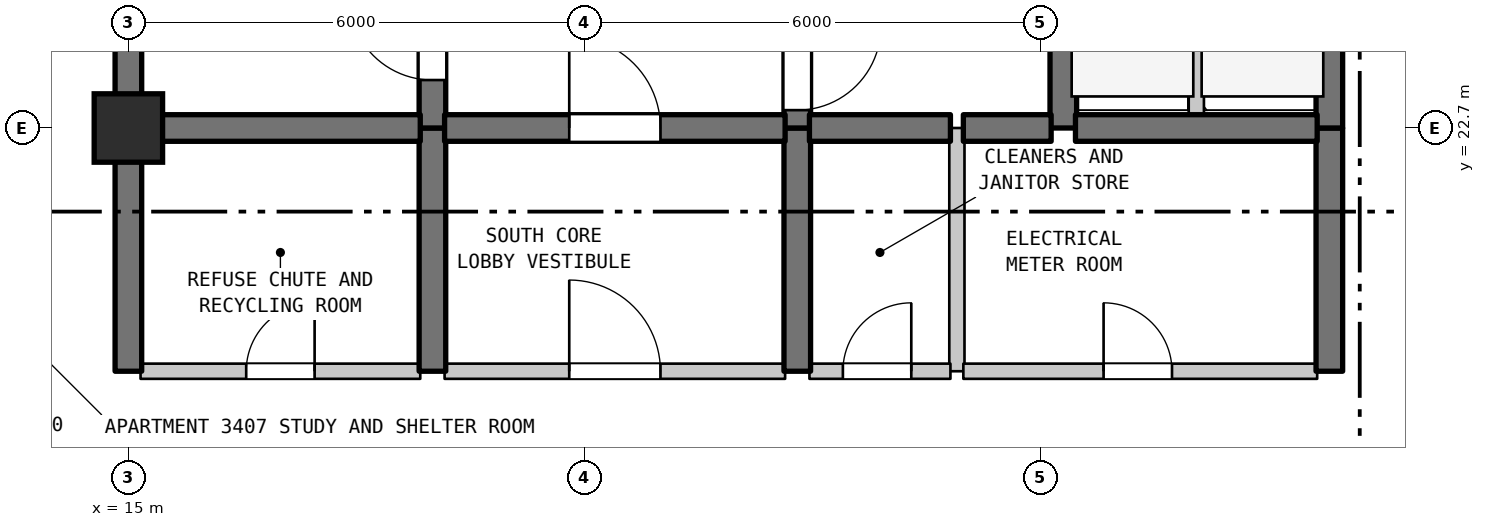
"""IFC4 building model, lengths in metres.
Left out: names, types, materials, properties, quantities, classifications, styles, units other than length and angle.
Written with IfcOpenShell. Run it as: python <this file> out.ifc"""

import sys

from ifc_helpers import new_model, si_unit, direction, frame, frame_2d, origin, origin_2d, place, context, subcontext, project, spatial, rectangle, extrude, element, fill, save


model = new_model("IFC4")
c1 = context("Model", 3, precision=1e-05, world=origin(), true_north=direction((0.0, 1.0)))
c2 = subcontext(c1, "Body", "Model", "MODEL_VIEW")
j1 = project(units=[si_unit("LENGTHUNIT", "METRE"), si_unit("PLANEANGLEUNIT", "RADIAN")], contexts=[c1])
p1 = place(None, origin())
s1 = spatial("IfcSite", under=j1, at=p1, CompositionType="ELEMENT")
p2 = place(p1, origin())
s2 = spatial("IfcBuilding", under=s1, at=p2, CompositionType="ELEMENT")
p3 = place(p2, frame((0.0, 0.0, 140.9)))
s3 = spatial("IfcBuildingStorey", under=s2, at=p3, CompositionType="ELEMENT", Elevation=140.9)
p4 = place(p3, frame((15.0, 22.7, 0.0), z_axis=(0.0, 0.0, 1.0), x_axis=(1.0, 0.0, 0.0)))
e1 = element("IfcColumn", 1, at=p4, inside=s3, PredefinedType="COLUMN", context=c2, shape_type="SweptSolid", body=[
    extrude(rectangle(XDim=0.9, YDim=0.9, at=origin_2d()), origin(), (0.0, 0.0, 1.0), 3.7),
])
p5 = place(p3, frame((15.0, 19.5, 0.0), z_axis=(0.0, 0.0, 1.0), x_axis=(0.0, 1.0, 0.0)))
e2 = element("IfcWall", 2, at=p5, inside=s3, PredefinedType="SHEAR", context=c2, shape_type="SweptSolid", body=[
    extrude(rectangle(XDim=3.2, YDim=0.35, at=frame_2d((1.6, 0.0))), origin(), (0.0, 0.0, 1.0), 3.385),
])
p6 = place(p3, frame((15.0, 22.7, 0.0), z_axis=(0.0, 0.0, 1.0), x_axis=(0.0, 1.0, 0.0)))
e3 = element("IfcWall", 3, at=p6, inside=s3, PredefinedType="SHEAR", context=c2, shape_type="SweptSolid", body=[
    extrude(rectangle(XDim=6.8, YDim=0.35, at=frame_2d((3.4, 0.0))), origin(), (0.0, 0.0, 1.0), 3.385),
])
p7 = place(p3, frame((19.0, 19.5, 0.0), z_axis=(0.0, 0.0, 1.0), x_axis=(0.0, 1.0, 0.0)))
e4 = element("IfcWall", 4, at=p7, inside=s3, PredefinedType="SHEAR", context=c2, shape_type="SweptSolid", body=[
    extrude(rectangle(XDim=3.2, YDim=0.35, at=frame_2d((1.6, 0.0))), origin(), (0.0, 0.0, 1.0), 3.385),
])
p8 = place(p3, frame((19.0, 22.7, 0.0), z_axis=(0.0, 0.0, 1.0), x_axis=(0.0, 1.0, 0.0)))
e5 = element("IfcWall", 5, at=p8, inside=s3, PredefinedType="SHEAR", context=c2, shape_type="SweptSolid", body=[
    extrude(rectangle(XDim=5.5, YDim=0.35, at=frame_2d((2.75, 0.0))), origin(), (0.0, 0.0, 1.0), 3.385),
])
p9 = place(p8, frame((0.631, 0.0, 0.0)))
e6 = element("IfcOpeningElement", 6, at=p9, cuts=e5, PredefinedType="OPENING", context=c2, shape_type="SweptSolid", body=[
    extrude(rectangle(XDim=1.1, YDim=2.15, at=frame_2d((0.55, 1.075))), frame((0.0, 0.185, 0.0), z_axis=(0.0, -1.0, 0.0), x_axis=(1.0, 0.0, 0.0)), (0.0, 0.0, 1.0), 0.37),
])
p10 = place(p3, frame((23.8, 19.5, 0.0), z_axis=(0.0, 0.0, 1.0), x_axis=(0.0, 1.0, 0.0)))
e7 = element("IfcWall", 7, at=p10, inside=s3, PredefinedType="SHEAR", context=c2, shape_type="SweptSolid", body=[
    extrude(rectangle(XDim=3.2, YDim=0.35, at=frame_2d((1.6, 0.0))), origin(), (0.0, 0.0, 1.0), 3.385),
])
p11 = place(p3, frame((23.8, 22.7, 0.0), z_axis=(0.0, 0.0, 1.0), x_axis=(0.0, 1.0, 0.0)))
e8 = element("IfcWall", 8, at=p11, inside=s3, PredefinedType="SHEAR", context=c2, shape_type="SweptSolid", body=[
    extrude(rectangle(XDim=5.5, YDim=0.35, at=frame_2d((2.75, 0.0))), origin(), (0.0, 0.0, 1.0), 3.385),
])
p12 = place(p11, frame((0.235, 0.0, 0.0)))
e9 = element("IfcOpeningElement", 9, at=p12, cuts=e8, PredefinedType="OPENING", context=c2, shape_type="SweptSolid", body=[
    extrude(rectangle(XDim=1.1, YDim=2.15, at=frame_2d((0.55, 1.075))), frame((0.0, 0.185, 0.0), z_axis=(0.0, -1.0, 0.0), x_axis=(1.0, 0.0, 0.0)), (0.0, 0.0, 1.0), 0.37),
])
p13 = place(p3, frame((25.9, 19.5, 0.0), z_axis=(0.0, 0.0, 1.0), x_axis=(0.0, 1.0, 0.0)))
e10 = element("IfcWall", 10, at=p13, inside=s3, PredefinedType="STANDARD", context=c2, shape_type="SweptSolid", body=[
    extrude(rectangle(XDim=3.2, YDim=0.2, at=frame_2d((1.6, 0.0))), origin(), (0.0, 0.0, 1.0), 3.385),
])
p14 = place(p3, frame((27.3, 22.7, 0.0), z_axis=(0.0, 0.0, 1.0), x_axis=(0.0, 1.0, 0.0)))
e11 = element("IfcWall", 11, at=p14, inside=s3, PredefinedType="SHEAR", context=c2, shape_type="SweptSolid", body=[
    extrude(rectangle(XDim=2.9, YDim=0.35, at=frame_2d((1.45, 0.0))), origin(), (0.0, 0.0, 1.0), 3.385),
])
p15 = place(p3, frame((29.05, 22.7, 0.0), z_axis=(0.0, 0.0, 1.0), x_axis=(0.0, 1.0, 0.0)))
e12 = element("IfcWall", 12, at=p15, inside=s3, PredefinedType="STANDARD", context=c2, shape_type="SweptSolid", body=[
    extrude(rectangle(XDim=2.9, YDim=0.2, at=frame_2d((1.45, 0.0))), origin(), (0.0, 0.0, 1.0), 3.385),
])
p16 = place(p3, frame((30.8, 19.5, 0.0), z_axis=(0.0, 0.0, 1.0), x_axis=(0.0, 1.0, 0.0)))
e13 = element("IfcWall", 13, at=p16, inside=s3, PredefinedType="SHEAR", context=c2, shape_type="SweptSolid", body=[
    extrude(rectangle(XDim=3.2, YDim=0.35, at=frame_2d((1.6, 0.0))), origin(), (0.0, 0.0, 1.0), 3.385),
])
p17 = place(p3, frame((30.8, 22.7, 0.0), z_axis=(0.0, 0.0, 1.0), x_axis=(0.0, 1.0, 0.0)))
e14 = element("IfcWall", 14, at=p17, inside=s3, PredefinedType="SHEAR", context=c2, shape_type="SweptSolid", body=[
    extrude(rectangle(XDim=2.9, YDim=0.35, at=frame_2d((1.45, 0.0))), origin(), (0.0, 0.0, 1.0), 3.385),
])
p18 = place(p3, frame((15.16, 19.5, 0.0), z_axis=(0.0, 0.0, 1.0), x_axis=(1.0, 0.0, 0.0)))
e15 = element("IfcWall", 15, at=p18, inside=s3, PredefinedType="STANDARD", context=c2, shape_type="SweptSolid", body=[
    extrude(rectangle(XDim=3.68, YDim=0.2, at=frame_2d((1.84, 0.0))), origin(), (0.0, 0.0, 1.0), 3.385),
])
p19 = place(p18, frame((1.39, 0.0, 0.0)))
e16 = element("IfcOpeningElement", 16, at=p19, cuts=e15, PredefinedType="OPENING", context=c2, shape_type="SweptSolid", body=[
    extrude(rectangle(XDim=0.9, YDim=2.15, at=frame_2d((0.45, 1.075))), frame((0.0, 0.11, 0.0), z_axis=(0.0, -1.0, 0.0), x_axis=(1.0, 0.0, 0.0)), (0.0, 0.0, 1.0), 0.22),
])
p20 = place(p3, frame((19.16, 19.5, 0.0), z_axis=(0.0, 0.0, 1.0), x_axis=(1.0, 0.0, 0.0)))
e17 = element("IfcWall", 17, at=p20, inside=s3, PredefinedType="STANDARD", context=c2, shape_type="SweptSolid", body=[
    extrude(rectangle(XDim=4.48, YDim=0.2, at=frame_2d((2.24, 0.0))), origin(), (0.0, 0.0, 1.0), 3.385),
])
p21 = place(p20, frame((1.64, 0.0, 0.0)))
e18 = element("IfcOpeningElement", 18, at=p21, cuts=e17, PredefinedType="OPENING", context=c2, shape_type="SweptSolid", body=[
    extrude(rectangle(XDim=1.2, YDim=2.2, at=frame_2d((0.6, 1.1))), frame((0.0, 0.11, 0.0), z_axis=(0.0, -1.0, 0.0), x_axis=(1.0, 0.0, 0.0)), (0.0, 0.0, 1.0), 0.22),
])
p22 = place(p3, frame((23.96, 19.5, 0.0), z_axis=(0.0, 0.0, 1.0), x_axis=(1.0, 0.0, 0.0)))
e19 = element("IfcWall", 19, at=p22, inside=s3, PredefinedType="STANDARD", context=c2, shape_type="SweptSolid", body=[
    extrude(rectangle(XDim=1.855, YDim=0.2, at=frame_2d((0.927, 0.0))), origin(), (0.0, 0.0, 1.0), 3.385),
])
p23 = place(p22, frame((0.44, 0.0, 0.0)))
e20 = element("IfcOpeningElement", 20, at=p23, cuts=e19, PredefinedType="OPENING", context=c2, shape_type="SweptSolid", body=[
    extrude(rectangle(XDim=0.9, YDim=2.15, at=frame_2d((0.45, 1.075))), frame((0.0, 0.11, 0.0), z_axis=(0.0, -1.0, 0.0), x_axis=(1.0, 0.0, 0.0)), (0.0, 0.0, 1.0), 0.22),
])
p24 = place(p3, frame((25.985, 19.5, 0.0), z_axis=(0.0, 0.0, 1.0), x_axis=(1.0, 0.0, 0.0)))
e21 = element("IfcWall", 21, at=p24, inside=s3, PredefinedType="STANDARD", context=c2, shape_type="SweptSolid", body=[
    extrude(rectangle(XDim=4.655, YDim=0.2, at=frame_2d((2.327, 0.0))), origin(), (0.0, 0.0, 1.0), 3.385),
])
p25 = place(p24, frame((1.845, 0.0, 0.0)))
e22 = element("IfcOpeningElement", 22, at=p25, cuts=e21, PredefinedType="OPENING", context=c2, shape_type="SweptSolid", body=[
    extrude(rectangle(XDim=0.9, YDim=2.15, at=frame_2d((0.45, 1.075))), frame((0.0, 0.11, 0.0), z_axis=(0.0, -1.0, 0.0), x_axis=(1.0, 0.0, 0.0)), (0.0, 0.0, 1.0), 0.22),
])
p26 = place(p3, frame((15.16, 22.7, 0.0), z_axis=(0.0, 0.0, 1.0), x_axis=(1.0, 0.0, 0.0)))
e23 = element("IfcWall", 23, at=p26, inside=s3, PredefinedType="SHEAR", context=c2, shape_type="SweptSolid", body=[
    extrude(rectangle(XDim=3.68, YDim=0.35, at=frame_2d((1.84, 0.0))), origin(), (0.0, 0.0, 1.0), 3.385),
])
p27 = place(p3, frame((19.16, 22.7, 0.0), z_axis=(0.0, 0.0, 1.0), x_axis=(1.0, 0.0, 0.0)))
e24 = element("IfcWall", 24, at=p27, inside=s3, PredefinedType="SHEAR", context=c2, shape_type="SweptSolid", body=[
    extrude(rectangle(XDim=4.48, YDim=0.35, at=frame_2d((2.24, 0.0))), origin(), (0.0, 0.0, 1.0), 3.385),
])
p28 = place(p27, frame((1.64, 0.0, 0.0)))
e25 = element("IfcOpeningElement", 25, at=p28, cuts=e24, PredefinedType="OPENING", context=c2, shape_type="SweptSolid", body=[
    extrude(rectangle(XDim=1.2, YDim=2.2, at=frame_2d((0.6, 1.1))), frame((0.0, 0.185, 0.0), z_axis=(0.0, -1.0, 0.0), x_axis=(1.0, 0.0, 0.0)), (0.0, 0.0, 1.0), 0.37),
])
p29 = place(p3, frame((23.96, 22.7, 0.0), z_axis=(0.0, 0.0, 1.0), x_axis=(1.0, 0.0, 0.0)))
e26 = element("IfcWall", 26, at=p29, inside=s3, PredefinedType="SHEAR", context=c2, shape_type="SweptSolid", body=[
    extrude(rectangle(XDim=1.855, YDim=0.35, at=frame_2d((0.927, 0.0))), origin(), (0.0, 0.0, 1.0), 3.385),
])
p30 = place(p3, frame((25.985, 22.7, 0.0), z_axis=(0.0, 0.0, 1.0), x_axis=(1.0, 0.0, 0.0)))
e27 = element("IfcWall", 27, at=p30, inside=s3, PredefinedType="SHEAR", context=c2, shape_type="SweptSolid", body=[
    extrude(rectangle(XDim=1.155, YDim=0.35, at=frame_2d((0.577, 0.0))), origin(), (0.0, 0.0, 1.0), 3.385),
])
p31 = place(p3, frame((27.46, 22.7, 0.0), z_axis=(0.0, 0.0, 1.0), x_axis=(1.0, 0.0, 0.0)))
e28 = element("IfcWall", 28, at=p31, inside=s3, PredefinedType="SHEAR", context=c2, shape_type="SweptSolid", body=[
    extrude(rectangle(XDim=3.18, YDim=0.35, at=frame_2d((1.59, 0.0))), origin(), (0.0, 0.0, 1.0), 3.385),
])
p32 = place(p9, origin())
e29 = element("IfcDoor", 29, at=p32, inside=s3, OperationType="SINGLE_SWING_RIGHT", PredefinedType="DOOR", context=c2, shape_type="SweptSolid", body=[
    extrude(rectangle(XDim=1.1, YDim=2.15, at=frame_2d((0.55, 1.075))), frame((0.0, 0.025, 0.0), z_axis=(0.0, -1.0, 0.0), x_axis=(1.0, 0.0, 0.0)), (0.0, 0.0, 1.0), 0.05),
])
fill(e6, e29)
p33 = place(p12, frame((1.1, 0.0, 0.0), z_axis=(0.0, 0.0, 1.0), x_axis=(-1.0, 0.0, 0.0)))
e30 = element("IfcDoor", 30, at=p33, inside=s3, OperationType="SINGLE_SWING_RIGHT", PredefinedType="DOOR", context=c2, shape_type="SweptSolid", body=[
    extrude(rectangle(XDim=1.1, YDim=2.15, at=frame_2d((0.55, 1.075))), frame((0.0, 0.025, 0.0), z_axis=(0.0, -1.0, 0.0), x_axis=(1.0, 0.0, 0.0)), (0.0, 0.0, 1.0), 0.05),
])
fill(e9, e30)
p34 = place(p19, origin())
e31 = element("IfcDoor", 31, at=p34, inside=s3, OperationType="SINGLE_SWING_RIGHT", PredefinedType="DOOR", context=c2, shape_type="SweptSolid", body=[
    extrude(rectangle(XDim=0.9, YDim=2.15, at=frame_2d((0.45, 1.075))), frame((0.0, 0.025, 0.0), z_axis=(0.0, -1.0, 0.0), x_axis=(1.0, 0.0, 0.0)), (0.0, 0.0, 1.0), 0.05),
])
fill(e16, e31)
p35 = place(p21, origin())
e32 = element("IfcDoor", 32, at=p35, inside=s3, OperationType="SINGLE_SWING_LEFT", PredefinedType="DOOR", context=c2, shape_type="SweptSolid", body=[
    extrude(rectangle(XDim=1.2, YDim=2.2, at=frame_2d((0.6, 1.1))), frame((0.0, 0.025, 0.0), z_axis=(0.0, -1.0, 0.0), x_axis=(1.0, 0.0, 0.0)), (0.0, 0.0, 1.0), 0.05),
])
fill(e18, e32)
p36 = place(p23, origin())
e33 = element("IfcDoor", 33, at=p36, inside=s3, OperationType="SINGLE_SWING_RIGHT", PredefinedType="DOOR", context=c2, shape_type="SweptSolid", body=[
    extrude(rectangle(XDim=0.9, YDim=2.15, at=frame_2d((0.45, 1.075))), frame((0.0, 0.025, 0.0), z_axis=(0.0, -1.0, 0.0), x_axis=(1.0, 0.0, 0.0)), (0.0, 0.0, 1.0), 0.05),
])
fill(e20, e33)
p37 = place(p25, origin())
e34 = element("IfcDoor", 34, at=p37, inside=s3, OperationType="SINGLE_SWING_LEFT", PredefinedType="DOOR", context=c2, shape_type="SweptSolid", body=[
    extrude(rectangle(XDim=0.9, YDim=2.15, at=frame_2d((0.45, 1.075))), frame((0.0, 0.025, 0.0), z_axis=(0.0, -1.0, 0.0), x_axis=(1.0, 0.0, 0.0)), (0.0, 0.0, 1.0), 0.05),
])
fill(e22, e34)
p38 = place(p28, origin())
e35 = element("IfcDoor", 35, at=p38, inside=s3, OperationType="SINGLE_SWING_LEFT", PredefinedType="DOOR", context=c2, shape_type="SweptSolid", body=[
    extrude(rectangle(XDim=1.2, YDim=2.2, at=frame_2d((0.6, 1.1))), frame((0.0, 0.025, 0.0), z_axis=(0.0, -1.0, 0.0), x_axis=(1.0, 0.0, 0.0)), (0.0, 0.0, 1.0), 0.05),
])
fill(e25, e35)
save(model, sys.argv[1])
